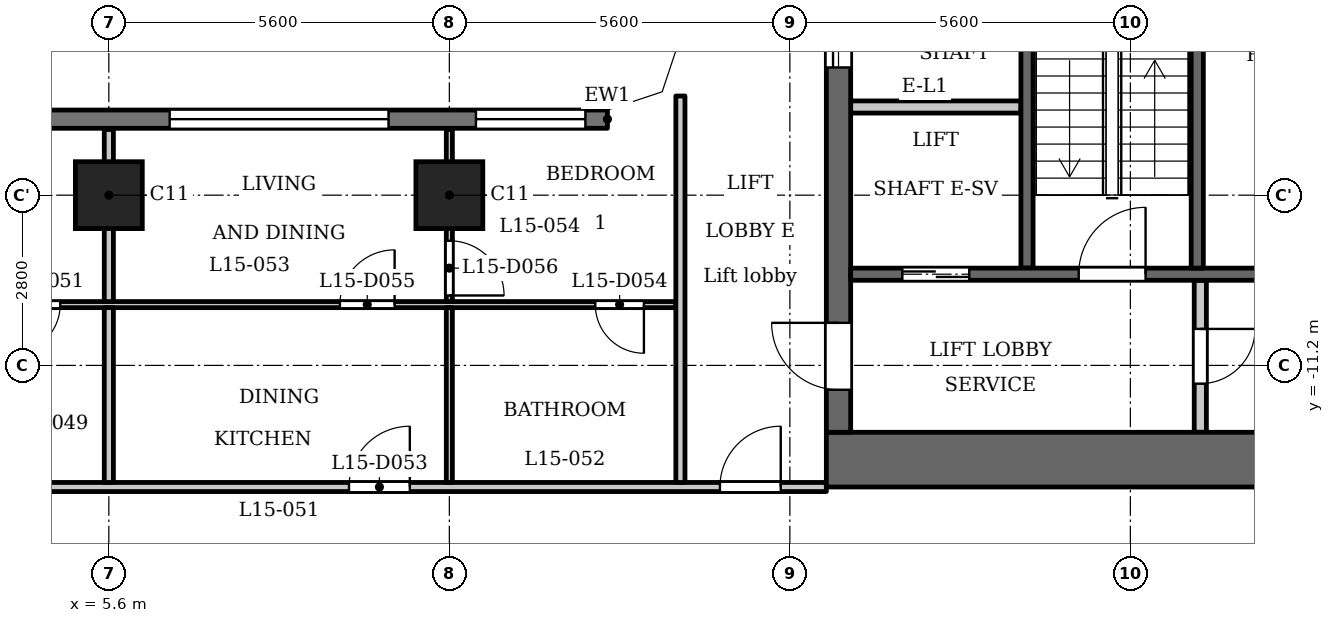
"""IFC4 building model, lengths in metres.
Left out: names, types, materials, properties, quantities, classifications, styles, units other than length and angle.
Written with IfcOpenShell. Run it as: python <this file> out.ifc"""

import sys

from ifc_helpers import new_model, si_unit, direction, frame, frame_2d, origin, origin_2d, place, context, subcontext, project, spatial, polyline, rectangle, outline, extrude, element, fill, save


model = new_model("IFC4")
c1 = context("Model", 3, precision=1e-05, world=origin(), true_north=direction((0.0, 1.0)))
c2 = subcontext(c1, "Body", "Model", "MODEL_VIEW")
j1 = project(units=[si_unit("LENGTHUNIT", "METRE"), si_unit("PLANEANGLEUNIT", "RADIAN")], contexts=[c1])
p1 = place(None, origin())
s1 = spatial("IfcSite", under=j1, at=p1, CompositionType="ELEMENT")
p2 = place(p1, origin())
s2 = spatial("IfcBuilding", under=s1, at=p2, CompositionType="ELEMENT")
p3 = place(p2, frame((0.0, 0.0, 62.0)))
s3 = spatial("IfcBuildingStorey", under=s2, at=p3, CompositionType="ELEMENT", Elevation=62.0)
for number, where, z_axis, x_axis in (
    (1, (5.6, -8.4, 0.0), (0.0, 0.0, 1.0), (1.0, 0.0, 0.0)),
    (2, (11.2, -8.4, 0.0), (0.0, 0.0, 1.0), (1.0, 0.0, 0.0)),
):
    element("IfcColumn", number, at=place(p3, frame(where, z_axis=z_axis, x_axis=x_axis)), inside=s3, PredefinedType="COLUMN", context=c2, shape_type="SweptSolid", body=[
        extrude(rectangle(XDim=1.1, YDim=1.1, at=origin_2d()), origin(), (0.0, 0.0, 1.0), 3.5),
    ])
p4 = place(p3, frame((13.8, -7.15, 0.0), z_axis=(0.0, 0.0, 1.0), x_axis=(-1.0, 0.0, 0.0)))
e3 = element("IfcWall", 3, at=p4, inside=s3, PredefinedType="SOLIDWALL", context=c2, shape_type="SweptSolid", body=[
    extrude(rectangle(XDim=27.6, YDim=0.3, at=frame_2d((13.8, 0.0))), origin(), (0.0, 0.0, 1.0), 3.2),
])
p5 = place(p4, frame((0.363, 0.0, 0.9)))
e4 = element("IfcOpeningElement", 4, at=p5, cuts=e3, PredefinedType="OPENING", context=c2, shape_type="SweptSolid", body=[
    extrude(rectangle(XDim=1.8, YDim=1.25, at=frame_2d((0.9, 0.625))), frame((0.0, 0.16, 0.0), z_axis=(0.0, -1.0, 0.0), x_axis=(1.0, 0.0, 0.0)), (0.0, 0.0, 1.0), 0.32),
])
p6 = place(p4, frame((3.6, 0.0, 1.2)))
e5 = element("IfcOpeningElement", 5, at=p6, cuts=e3, PredefinedType="OPENING", context=c2, shape_type="SweptSolid", body=[
    extrude(rectangle(XDim=3.6, YDim=0.95, at=frame_2d((1.8, 0.475))), frame((0.0, 0.16, 0.0), z_axis=(0.0, -1.0, 0.0), x_axis=(1.0, 0.0, 0.0)), (0.0, 0.0, 1.0), 0.32),
])
p7 = place(p4, frame((9.2, 0.0, 1.2)))
e6 = element("IfcOpeningElement", 6, at=p7, cuts=e3, PredefinedType="OPENING", context=c2, shape_type="SweptSolid", body=[
    extrude(rectangle(XDim=3.6, YDim=0.95, at=frame_2d((1.8, 0.475))), frame((0.0, 0.16, 0.0), z_axis=(0.0, -1.0, 0.0), x_axis=(1.0, 0.0, 0.0)), (0.0, 0.0, 1.0), 0.32),
])
p8 = place(p4, frame((14.8, 0.0, 1.2)))
e7 = element("IfcOpeningElement", 7, at=p8, cuts=e3, PredefinedType="OPENING", context=c2, shape_type="SweptSolid", body=[
    extrude(rectangle(XDim=3.6, YDim=0.95, at=frame_2d((1.8, 0.475))), frame((0.0, 0.16, 0.0), z_axis=(0.0, -1.0, 0.0), x_axis=(1.0, 0.0, 0.0)), (0.0, 0.0, 1.0), 0.32),
])
p9 = place(p4, frame((20.4, 0.0, 1.2)))
e8 = element("IfcOpeningElement", 8, at=p9, cuts=e3, PredefinedType="OPENING", context=c2, shape_type="SweptSolid", body=[
    extrude(rectangle(XDim=3.6, YDim=0.95, at=frame_2d((1.8, 0.475))), frame((0.0, 0.16, 0.0), z_axis=(0.0, -1.0, 0.0), x_axis=(1.0, 0.0, 0.0)), (0.0, 0.0, 1.0), 0.32),
])
p10 = place(p4, frame((25.438, 0.0, 0.9)))
e9 = element("IfcOpeningElement", 9, at=p10, cuts=e3, PredefinedType="OPENING", context=c2, shape_type="SweptSolid", body=[
    extrude(rectangle(XDim=1.8, YDim=1.25, at=frame_2d((0.9, 0.625))), frame((0.0, 0.16, 0.0), z_axis=(0.0, -1.0, 0.0), x_axis=(1.0, 0.0, 0.0)), (0.0, 0.0, 1.0), 0.32),
])
p11 = place(p3, frame((20.7, -9.6, 0.0), z_axis=(0.0, 0.0, 1.0), x_axis=(0.0, 1.0, 0.0)))
e10 = element("IfcWall", 10, at=p11, inside=s3, PredefinedType="SHEAR", context=c2, shape_type="SweptSolid", body=[
    extrude(rectangle(XDim=9.75, YDim=0.2, at=frame_2d((4.875, 0.0))), origin(), (0.0, 0.0, 1.0), 3.2),
])
p12 = place(p3, frame((17.4, -12.75, 0.0), z_axis=(0.0, 0.0, 1.0), x_axis=(1.0, 0.0, 0.0)))
e11 = element("IfcWall", 11, at=p12, inside=s3, PredefinedType="SHEAR", context=c2, shape_type="SweptSolid", body=[
    extrude(rectangle(XDim=10.4, YDim=0.9, at=frame_2d((5.2, 0.0))), origin(), (0.0, 0.0, 1.0), 3.2),
])
p13 = place(p3, frame((17.6, -12.3, 0.0), z_axis=(0.0, 0.0, 1.0), x_axis=(0.0, 1.0, 0.0)))
e12 = element("IfcWall", 12, at=p13, inside=s3, PredefinedType="SHEAR", context=c2, shape_type="SweptSolid", body=[
    extrude(rectangle(XDim=24.6, YDim=0.4, at=frame_2d((12.3, 0.0))), origin(), (0.0, 0.0, 1.0), 3.2),
])
p14 = place(p13, frame((6.0, 0.0, 0.0)))
e13 = element("IfcOpeningElement", 13, at=p14, cuts=e12, PredefinedType="OPENING", context=c2, shape_type="SweptSolid", body=[
    extrude(rectangle(XDim=1.1, YDim=2.1, at=frame_2d((0.55, 1.05))), frame((0.0, 0.21, 0.0), z_axis=(0.0, -1.0, 0.0), x_axis=(1.0, 0.0, 0.0)), (0.0, 0.0, 1.0), 0.42),
])
p15 = place(p13, frame((8.4, 0.0, 0.0)))
e14 = element("IfcOpeningElement", 14, at=p15, cuts=e12, PredefinedType="OPENING", context=c2, shape_type="SweptSolid", body=[
    extrude(rectangle(XDim=1.1, YDim=2.1, at=frame_2d((0.55, 1.05))), frame((0.0, 0.21, 0.0), z_axis=(0.0, -1.0, 0.0), x_axis=(1.0, 0.0, 0.0)), (0.0, 0.0, 1.0), 0.42),
])
p16 = place(p13, frame((10.8, 0.0, 0.0)))
e15 = element("IfcOpeningElement", 15, at=p16, cuts=e12, PredefinedType="OPENING", context=c2, shape_type="SweptSolid", body=[
    extrude(rectangle(XDim=1.1, YDim=2.1, at=frame_2d((0.55, 1.05))), frame((0.0, 0.21, 0.0), z_axis=(0.0, -1.0, 0.0), x_axis=(1.0, 0.0, 0.0)), (0.0, 0.0, 1.0), 0.42),
])
p17 = place(p13, frame((16.75, 0.0, 0.0)))
e16 = element("IfcOpeningElement", 16, at=p17, cuts=e12, PredefinedType="OPENING", context=c2, shape_type="SweptSolid", body=[
    extrude(rectangle(XDim=0.9, YDim=2.1, at=frame_2d((0.45, 1.05))), frame((0.0, 0.21, 0.0), z_axis=(0.0, -1.0, 0.0), x_axis=(1.0, 0.0, 0.0)), (0.0, 0.0, 1.0), 0.42),
])
p18 = place(p13, frame((22.8, 0.0, 0.0)))
e17 = element("IfcOpeningElement", 17, at=p18, cuts=e12, PredefinedType="OPENING", context=c2, shape_type="SweptSolid", body=[
    extrude(rectangle(XDim=1.1, YDim=2.1, at=frame_2d((0.55, 1.05))), frame((0.0, 0.21, 0.0), z_axis=(0.0, -1.0, 0.0), x_axis=(1.0, 0.0, 0.0)), (0.0, 0.0, 1.0), 0.42),
])
p19 = place(p13, frame((0.7, 0.0, 0.0)))
e18 = element("IfcOpeningElement", 18, at=p19, cuts=e12, PredefinedType="OPENING", context=c2, shape_type="SweptSolid", body=[
    extrude(rectangle(XDim=1.1, YDim=2.1, at=frame_2d((0.55, 1.05))), frame((0.0, 0.21, 0.0), z_axis=(0.0, -1.0, 0.0), x_axis=(1.0, 0.0, 0.0)), (0.0, 0.0, 1.0), 0.42),
])
p20 = place(p13, frame((12.775, 0.0, 0.0)))
e19 = element("IfcOpeningElement", 19, at=p20, cuts=e12, PredefinedType="OPENING", context=c2, shape_type="SweptSolid", body=[
    extrude(rectangle(XDim=1.8, YDim=2.1, at=frame_2d((0.9, 1.05))), frame((0.0, 0.21, 0.0), z_axis=(0.0, -1.0, 0.0), x_axis=(1.0, 0.0, 0.0)), (0.0, 0.0, 1.0), 0.42),
])
p21 = place(p3, frame((23.55, -12.3, 0.0), z_axis=(0.0, 0.0, 1.0), x_axis=(0.0, 1.0, 0.0)))
e20 = element("IfcWall", 20, at=p21, inside=s3, PredefinedType="PARTITIONING", context=c2, shape_type="SweptSolid", body=[
    extrude(rectangle(XDim=2.5, YDim=0.2, at=frame_2d((1.25, 0.0))), origin(), (0.0, 0.0, 1.0), 3.2),
])
p22 = place(p21, frame((0.8, 0.0, 0.0)))
e21 = element("IfcOpeningElement", 21, at=p22, cuts=e20, PredefinedType="OPENING", context=c2, shape_type="SweptSolid", body=[
    extrude(rectangle(XDim=0.9, YDim=2.1, at=frame_2d((0.45, 1.05))), frame((0.0, 0.11, 0.0), z_axis=(0.0, -1.0, 0.0), x_axis=(1.0, 0.0, 0.0)), (0.0, 0.0, 1.0), 0.22),
])
p23 = place(p3, frame((17.8, -9.7, 0.0), z_axis=(0.0, 0.0, 1.0), x_axis=(1.0, 0.0, 0.0)))
e22 = element("IfcWall", 22, at=p23, inside=s3, PredefinedType="SHEAR", context=c2, shape_type="SweptSolid", body=[
    extrude(rectangle(XDim=8.3, YDim=0.2, at=frame_2d((4.15, 0.0))), origin(), (0.0, 0.0, 1.0), 3.2),
])
p24 = place(p23, frame((0.85, 0.0, 0.0)))
e23 = element("IfcOpeningElement", 23, at=p24, cuts=e22, PredefinedType="OPENING", context=c2, shape_type="SweptSolid", body=[
    extrude(rectangle(XDim=1.1, YDim=2.1, at=frame_2d((0.55, 1.05))), frame((0.0, 0.11, 0.0), z_axis=(0.0, -1.0, 0.0), x_axis=(1.0, 0.0, 0.0)), (0.0, 0.0, 1.0), 0.22),
])
p25 = place(p23, frame((3.75, 0.0, 0.0)))
e24 = element("IfcOpeningElement", 24, at=p25, cuts=e22, PredefinedType="OPENING", context=c2, shape_type="SweptSolid", body=[
    extrude(rectangle(XDim=1.1, YDim=2.1, at=frame_2d((0.55, 1.05))), frame((0.0, 0.11, 0.0), z_axis=(0.0, -1.0, 0.0), x_axis=(1.0, 0.0, 0.0)), (0.0, 0.0, 1.0), 0.22),
])
p26 = place(p3, frame((17.8, -6.95, 0.0), z_axis=(0.0, 0.0, 1.0), x_axis=(1.0, 0.0, 0.0)))
e25 = element("IfcWall", 25, at=p26, inside=s3, PredefinedType="PARTITIONING", context=c2, shape_type="SweptSolid", body=[
    extrude(rectangle(XDim=2.8, YDim=0.2, at=frame_2d((1.4, 0.0))), origin(), (0.0, 0.0, 1.0), 3.2),
])
p27 = place(p3, frame((23.5, -9.6, 0.0), z_axis=(0.0, 0.0, 1.0), x_axis=(0.0, 1.0, 0.0)))
e26 = element("IfcWall", 26, at=p27, inside=s3, PredefinedType="SHEAR", context=c2, shape_type="SweptSolid", body=[
    extrude(rectangle(XDim=6.9, YDim=0.2, at=frame_2d((3.45, 0.0))), origin(), (0.0, 0.0, 1.0), 3.2),
])
p28 = place(p3, frame((-17.4, -13.2, 0.0), z_axis=(0.0, 0.0, 1.0), x_axis=(1.0, 0.0, 0.0)))
e27 = element("IfcWall", 27, at=p28, inside=s3, PredefinedType="PARTITIONING", context=c2, shape_type="SweptSolid", body=[
    extrude(rectangle(XDim=34.8, YDim=0.15, at=frame_2d((17.4, 0.0))), origin(), (0.0, 0.0, 1.0), 3.2),
])
p29 = place(p28, frame((0.65, 0.0, 0.0)))
e28 = element("IfcOpeningElement", 28, at=p29, cuts=e27, PredefinedType="OPENING", context=c2, shape_type="SweptSolid", body=[
    extrude(rectangle(XDim=1.0, YDim=2.1, at=frame_2d((0.5, 1.05))), frame((0.0, 0.085, 0.0), z_axis=(0.0, -1.0, 0.0), x_axis=(1.0, 0.0, 0.0)), (0.0, 0.0, 1.0), 0.17),
])
p30 = place(p28, frame((33.05, 0.0, 0.0)))
e29 = element("IfcOpeningElement", 29, at=p30, cuts=e27, PredefinedType="OPENING", context=c2, shape_type="SweptSolid", body=[
    extrude(rectangle(XDim=1.0, YDim=2.1, at=frame_2d((0.5, 1.05))), frame((0.0, 0.085, 0.0), z_axis=(0.0, -1.0, 0.0), x_axis=(1.0, 0.0, 0.0)), (0.0, 0.0, 1.0), 0.17),
])
p31 = place(p28, frame((4.55, 0.0, 0.0)))
e30 = element("IfcOpeningElement", 30, at=p31, cuts=e27, PredefinedType="OPENING", context=c2, shape_type="SweptSolid", body=[
    extrude(rectangle(XDim=1.0, YDim=2.1, at=frame_2d((0.5, 1.05))), frame((0.0, 0.085, 0.0), z_axis=(0.0, -1.0, 0.0), x_axis=(1.0, 0.0, 0.0)), (0.0, 0.0, 1.0), 0.17),
])
p32 = place(p28, frame((15.75, 0.0, 0.0)))
e31 = element("IfcOpeningElement", 31, at=p32, cuts=e27, PredefinedType="OPENING", context=c2, shape_type="SweptSolid", body=[
    extrude(rectangle(XDim=1.0, YDim=2.1, at=frame_2d((0.5, 1.05))), frame((0.0, 0.085, 0.0), z_axis=(0.0, -1.0, 0.0), x_axis=(1.0, 0.0, 0.0)), (0.0, 0.0, 1.0), 0.17),
])
p33 = place(p28, frame((18.1, 0.0, 0.0)))
e32 = element("IfcOpeningElement", 32, at=p33, cuts=e27, PredefinedType="OPENING", context=c2, shape_type="SweptSolid", body=[
    extrude(rectangle(XDim=1.0, YDim=2.1, at=frame_2d((0.5, 1.05))), frame((0.0, 0.085, 0.0), z_axis=(0.0, -1.0, 0.0), x_axis=(1.0, 0.0, 0.0)), (0.0, 0.0, 1.0), 0.17),
])
p34 = place(p28, frame((26.95, 0.0, 0.0)))
e33 = element("IfcOpeningElement", 33, at=p34, cuts=e27, PredefinedType="OPENING", context=c2, shape_type="SweptSolid", body=[
    extrude(rectangle(XDim=1.0, YDim=2.1, at=frame_2d((0.5, 1.05))), frame((0.0, 0.085, 0.0), z_axis=(0.0, -1.0, 0.0), x_axis=(1.0, 0.0, 0.0)), (0.0, 0.0, 1.0), 0.17),
])
p35 = place(p3, frame((-14.925, -10.2, 0.0), z_axis=(0.0, 0.0, 1.0), x_axis=(1.0, 0.0, 0.0)))
e34 = element("IfcWall", 34, at=p35, inside=s3, PredefinedType="PARTITIONING", context=c2, shape_type="SweptSolid", body=[
    extrude(rectangle(XDim=29.85, YDim=0.1, at=frame_2d((14.925, 0.0))), origin(), (0.0, 0.0, 1.0), 3.2),
])
p36 = place(p35, frame((7.625, 0.0, 0.0)))
e35 = element("IfcOpeningElement", 35, at=p36, cuts=e34, PredefinedType="OPENING", context=c2, shape_type="SweptSolid", body=[
    extrude(rectangle(XDim=0.8, YDim=2.1, at=frame_2d((0.4, 1.05))), frame((0.0, 0.06, 0.0), z_axis=(0.0, -1.0, 0.0), x_axis=(1.0, 0.0, 0.0)), (0.0, 0.0, 1.0), 0.12),
])
p37 = place(p35, frame((1.925, 0.0, 0.0)))
e36 = element("IfcOpeningElement", 36, at=p37, cuts=e34, PredefinedType="OPENING", context=c2, shape_type="SweptSolid", body=[
    extrude(rectangle(XDim=0.9, YDim=2.1, at=frame_2d((0.45, 1.05))), frame((0.0, 0.06, 0.0), z_axis=(0.0, -1.0, 0.0), x_axis=(1.0, 0.0, 0.0)), (0.0, 0.0, 1.0), 0.12),
])
p38 = place(p35, frame((10.225, 0.0, 0.0)))
e37 = element("IfcOpeningElement", 37, at=p38, cuts=e34, PredefinedType="OPENING", context=c2, shape_type="SweptSolid", body=[
    extrude(rectangle(XDim=0.8, YDim=2.1, at=frame_2d((0.4, 1.05))), frame((0.0, 0.06, 0.0), z_axis=(0.0, -1.0, 0.0), x_axis=(1.0, 0.0, 0.0)), (0.0, 0.0, 1.0), 0.12),
])
p39 = place(p35, frame((13.125, 0.0, 0.0)))
e38 = element("IfcOpeningElement", 38, at=p39, cuts=e34, PredefinedType="OPENING", context=c2, shape_type="SweptSolid", body=[
    extrude(rectangle(XDim=0.9, YDim=2.1, at=frame_2d((0.45, 1.05))), frame((0.0, 0.06, 0.0), z_axis=(0.0, -1.0, 0.0), x_axis=(1.0, 0.0, 0.0)), (0.0, 0.0, 1.0), 0.12),
])
p40 = place(p35, frame((18.925, 0.0, 0.0)))
e39 = element("IfcOpeningElement", 39, at=p40, cuts=e34, PredefinedType="OPENING", context=c2, shape_type="SweptSolid", body=[
    extrude(rectangle(XDim=0.8, YDim=2.1, at=frame_2d((0.4, 1.05))), frame((0.0, 0.06, 0.0), z_axis=(0.0, -1.0, 0.0), x_axis=(1.0, 0.0, 0.0)), (0.0, 0.0, 1.0), 0.12),
])
p41 = place(p35, frame((15.725, 0.0, 0.0)))
e40 = element("IfcOpeningElement", 40, at=p41, cuts=e34, PredefinedType="OPENING", context=c2, shape_type="SweptSolid", body=[
    extrude(rectangle(XDim=0.9, YDim=2.1, at=frame_2d((0.45, 1.05))), frame((0.0, 0.06, 0.0), z_axis=(0.0, -1.0, 0.0), x_axis=(1.0, 0.0, 0.0)), (0.0, 0.0, 1.0), 0.12),
])
p42 = place(p35, frame((28.525, 0.0, 0.0)))
e41 = element("IfcOpeningElement", 41, at=p42, cuts=e34, PredefinedType="OPENING", context=c2, shape_type="SweptSolid", body=[
    extrude(rectangle(XDim=0.8, YDim=2.1, at=frame_2d((0.4, 1.05))), frame((0.0, 0.06, 0.0), z_axis=(0.0, -1.0, 0.0), x_axis=(1.0, 0.0, 0.0)), (0.0, 0.0, 1.0), 0.12),
])
p43 = place(p35, frame((24.325, 0.0, 0.0)))
e42 = element("IfcOpeningElement", 42, at=p43, cuts=e34, PredefinedType="OPENING", context=c2, shape_type="SweptSolid", body=[
    extrude(rectangle(XDim=0.9, YDim=2.1, at=frame_2d((0.45, 1.05))), frame((0.0, 0.06, 0.0), z_axis=(0.0, -1.0, 0.0), x_axis=(1.0, 0.0, 0.0)), (0.0, 0.0, 1.0), 0.12),
])
p44 = place(p3, frame((5.6, -13.125, 0.0), z_axis=(0.0, 0.0, 1.0), x_axis=(0.0, 1.0, 0.0)))
e43 = element("IfcWall", 43, at=p44, inside=s3, PredefinedType="PARTITIONING", context=c2, shape_type="SweptSolid", body=[
    extrude(rectangle(XDim=2.875, YDim=0.15, at=frame_2d((1.438, 0.0))), origin(), (0.0, 0.0, 1.0), 3.2),
])
p45 = place(p3, frame((5.6, -10.15, 0.0), z_axis=(0.0, 0.0, 1.0), x_axis=(0.0, 1.0, 0.0)))
e44 = element("IfcWall", 44, at=p45, inside=s3, PredefinedType="PARTITIONING", context=c2, shape_type="SweptSolid", body=[
    extrude(rectangle(XDim=2.83, YDim=0.15, at=frame_2d((1.415, 0.0))), origin(), (0.0, 0.0, 1.0), 3.2),
])
p46 = place(p3, frame((11.2, -13.125, 0.0), z_axis=(0.0, 0.0, 1.0), x_axis=(0.0, 1.0, 0.0)))
e45 = element("IfcWall", 45, at=p46, inside=s3, PredefinedType="PARTITIONING", context=c2, shape_type="SweptSolid", body=[
    extrude(rectangle(XDim=2.875, YDim=0.1, at=frame_2d((1.438, 0.0))), origin(), (0.0, 0.0, 1.0), 3.2),
])
p47 = place(p3, frame((11.2, -10.15, 0.0), z_axis=(0.0, 0.0, 1.0), x_axis=(0.0, 1.0, 0.0)))
e46 = element("IfcWall", 46, at=p47, inside=s3, PredefinedType="PARTITIONING", context=c2, shape_type="SweptSolid", body=[
    extrude(rectangle(XDim=2.83, YDim=0.1, at=frame_2d((1.415, 0.0))), origin(), (0.0, 0.0, 1.0), 3.2),
])
p48 = place(p47, frame((0.1, 0.0, 0.0)))
e47 = element("IfcOpeningElement", 47, at=p48, cuts=e46, PredefinedType="OPENING", context=c2, shape_type="SweptSolid", body=[
    extrude(rectangle(XDim=0.9, YDim=2.1, at=frame_2d((0.45, 1.05))), frame((0.0, 0.06, 0.0), z_axis=(0.0, -1.0, 0.0), x_axis=(1.0, 0.0, 0.0)), (0.0, 0.0, 1.0), 0.12),
])
p49 = place(p3, frame((15.0, -13.125, 0.0), z_axis=(0.0, 0.0, 1.0), x_axis=(0.0, 1.0, 0.0)))
e48 = element("IfcWall", 48, at=p49, inside=s3, PredefinedType="PARTITIONING", context=c2, shape_type="SweptSolid", body=[
    extrude(rectangle(XDim=6.356, YDim=0.15, at=frame_2d((3.178, 0.0))), origin(), (0.0, 0.0, 1.0), 3.2),
])
p50 = place(p3, origin())
e49 = element("IfcWall", 49, at=p50, inside=s3, PredefinedType="SOLIDWALL", context=c2, shape_type="SweptSolid", body=[
    extrude(outline(polyline([(14.937, -6.937), (15.3, -5.849), (15.3, -5.8), (15.0, -5.8), (14.7, -6.7), (13.8, -7.0), (13.8, -7.3), (13.849, -7.3), (14.937, -6.937)])), origin(), (0.0, 0.0, 1.0), 3.2),
])
p51 = place(p24, origin())
e50 = element("IfcDoor", 50, at=p51, inside=s3, OperationType="DOUBLE_DOOR_SLIDING", PredefinedType="DOOR", context=c2, shape_type="SweptSolid", body=[
    extrude(rectangle(XDim=1.1, YDim=2.1, at=frame_2d((0.55, 1.05))), frame((0.0, 0.025, 0.0), z_axis=(0.0, -1.0, 0.0), x_axis=(1.0, 0.0, 0.0)), (0.0, 0.0, 1.0), 0.05),
])
fill(e23, e50)
p52 = place(p14, origin())
e51 = element("IfcDoor", 51, at=p52, inside=s3, OperationType="DOUBLE_DOOR_SLIDING", PredefinedType="DOOR", context=c2, shape_type="SweptSolid", body=[
    extrude(rectangle(XDim=1.1, YDim=2.1, at=frame_2d((0.55, 1.05))), frame((0.0, 0.025, 0.0), z_axis=(0.0, -1.0, 0.0), x_axis=(1.0, 0.0, 0.0)), (0.0, 0.0, 1.0), 0.05),
])
fill(e13, e51)
p53 = place(p19, origin())
e52 = element("IfcDoor", 52, at=p53, inside=s3, OperationType="SINGLE_SWING_LEFT", PredefinedType="DOOR", context=c2, shape_type="SweptSolid", body=[
    extrude(rectangle(XDim=1.1, YDim=2.1, at=frame_2d((0.55, 1.05))), frame((0.0, 0.025, 0.0), z_axis=(0.0, -1.0, 0.0), x_axis=(1.0, 0.0, 0.0)), (0.0, 0.0, 1.0), 0.05),
])
fill(e18, e52)
p54 = place(p22, origin())
e53 = element("IfcDoor", 53, at=p54, inside=s3, OperationType="SINGLE_SWING_RIGHT", PredefinedType="DOOR", context=c2, shape_type="SweptSolid", body=[
    extrude(rectangle(XDim=0.9, YDim=2.1, at=frame_2d((0.45, 1.05))), frame((0.0, 0.025, 0.0), z_axis=(0.0, -1.0, 0.0), x_axis=(1.0, 0.0, 0.0)), (0.0, 0.0, 1.0), 0.05),
])
fill(e21, e53)
p55 = place(p25, origin())
e54 = element("IfcDoor", 54, at=p55, inside=s3, OperationType="SINGLE_SWING_LEFT", PredefinedType="DOOR", context=c2, shape_type="SweptSolid", body=[
    extrude(rectangle(XDim=1.1, YDim=2.1, at=frame_2d((0.55, 1.05))), frame((0.0, 0.025, 0.0), z_axis=(0.0, -1.0, 0.0), x_axis=(1.0, 0.0, 0.0)), (0.0, 0.0, 1.0), 0.05),
])
fill(e24, e54)
p56 = place(p30, origin())
e55 = element("IfcDoor", 55, at=p56, inside=s3, OperationType="SINGLE_SWING_LEFT", PredefinedType="DOOR", context=c2, shape_type="SweptSolid", body=[
    extrude(rectangle(XDim=1.0, YDim=2.1, at=frame_2d((0.5, 1.05))), frame((0.0, 0.025, 0.0), z_axis=(0.0, -1.0, 0.0), x_axis=(1.0, 0.0, 0.0)), (0.0, 0.0, 1.0), 0.05),
])
fill(e29, e55)
p57 = place(p40, origin())
e56 = element("IfcDoor", 56, at=p57, inside=s3, OperationType="SINGLE_SWING_LEFT", PredefinedType="DOOR", context=c2, shape_type="SweptSolid", body=[
    extrude(rectangle(XDim=0.8, YDim=2.1, at=frame_2d((0.4, 1.05))), frame((0.0, 0.025, 0.0), z_axis=(0.0, -1.0, 0.0), x_axis=(1.0, 0.0, 0.0)), (0.0, 0.0, 1.0), 0.05),
])
fill(e39, e56)
p58 = place(p34, origin())
e57 = element("IfcDoor", 57, at=p58, inside=s3, OperationType="SINGLE_SWING_LEFT", PredefinedType="DOOR", context=c2, shape_type="SweptSolid", body=[
    extrude(rectangle(XDim=1.0, YDim=2.1, at=frame_2d((0.5, 1.05))), frame((0.0, 0.025, 0.0), z_axis=(0.0, -1.0, 0.0), x_axis=(1.0, 0.0, 0.0)), (0.0, 0.0, 1.0), 0.05),
])
fill(e33, e57)
p59 = place(p42, origin())
e58 = element("IfcDoor", 58, at=p59, inside=s3, OperationType="SINGLE_SWING_RIGHT", PredefinedType="DOOR", context=c2, shape_type="SweptSolid", body=[
    extrude(rectangle(XDim=0.8, YDim=2.1, at=frame_2d((0.4, 1.05))), frame((0.0, 0.025, 0.0), z_axis=(0.0, -1.0, 0.0), x_axis=(1.0, 0.0, 0.0)), (0.0, 0.0, 1.0), 0.05),
])
fill(e41, e58)
p60 = place(p43, origin())
e59 = element("IfcDoor", 59, at=p60, inside=s3, OperationType="SINGLE_SWING_LEFT", PredefinedType="DOOR", context=c2, shape_type="SweptSolid", body=[
    extrude(rectangle(XDim=0.9, YDim=2.1, at=frame_2d((0.45, 1.05))), frame((0.0, 0.025, 0.0), z_axis=(0.0, -1.0, 0.0), x_axis=(1.0, 0.0, 0.0)), (0.0, 0.0, 1.0), 0.05),
])
fill(e42, e59)
p61 = place(p48, origin())
e60 = element("IfcDoor", 60, at=p61, inside=s3, OperationType="SINGLE_SWING_LEFT", PredefinedType="DOOR", context=c2, shape_type="SweptSolid", body=[
    extrude(rectangle(XDim=0.9, YDim=2.1, at=frame_2d((0.45, 1.05))), frame((0.0, 0.025, 0.0), z_axis=(0.0, -1.0, 0.0), x_axis=(1.0, 0.0, 0.0)), (0.0, 0.0, 1.0), 0.05),
])
fill(e47, e60)
p62 = place(p5, origin())
e61 = element("IfcWindow", 61, at=p62, inside=s3, PartitioningType="SINGLE_PANEL", PredefinedType="WINDOW", context=c2, shape_type="SweptSolid", body=[
    extrude(rectangle(XDim=1.8, YDim=1.25, at=frame_2d((0.9, 0.625))), frame((0.0, 0.03, 0.0), z_axis=(0.0, -1.0, 0.0), x_axis=(1.0, 0.0, 0.0)), (0.0, 0.0, 1.0), 0.06),
])
fill(e4, e61)
p63 = place(p6, origin())
e62 = element("IfcWindow", 62, at=p63, inside=s3, PartitioningType="SINGLE_PANEL", PredefinedType="WINDOW", context=c2, shape_type="SweptSolid", body=[
    extrude(rectangle(XDim=3.6, YDim=0.95, at=frame_2d((1.8, 0.475))), frame((0.0, 0.03, 0.0), z_axis=(0.0, -1.0, 0.0), x_axis=(1.0, 0.0, 0.0)), (0.0, 0.0, 1.0), 0.06),
])
fill(e5, e62)
save(model, sys.argv[1])
